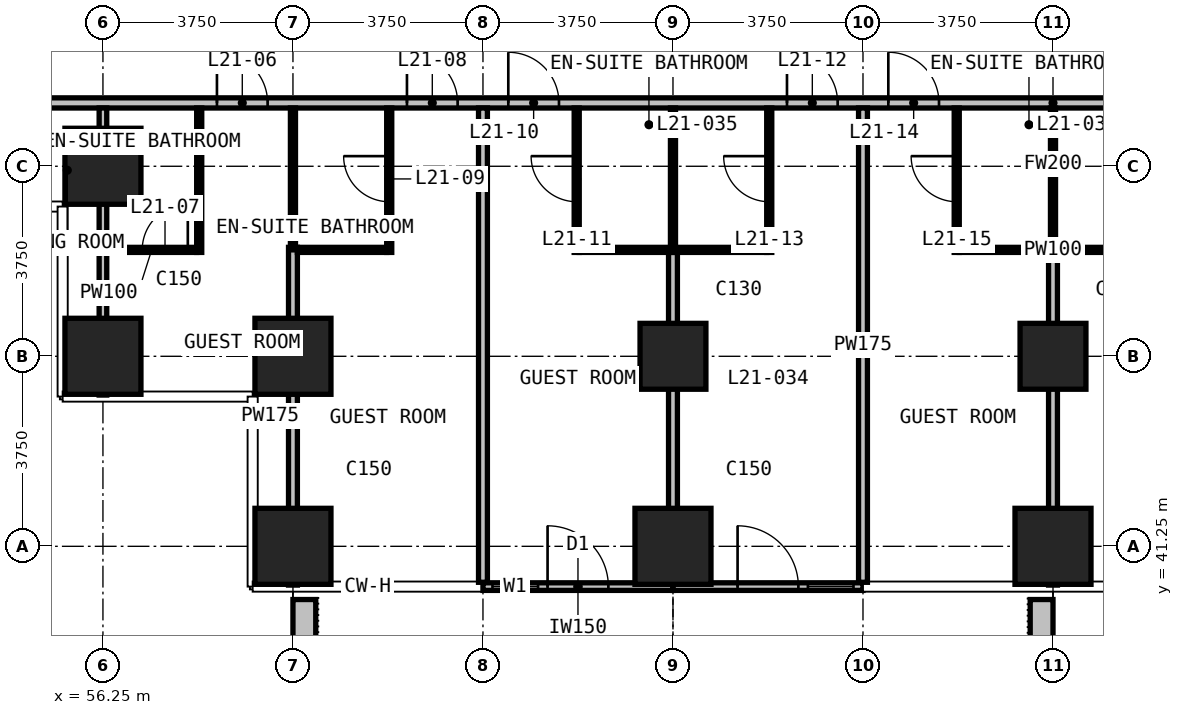
"""IFC4 building model, lengths in metres.
Left out: names, types, materials, properties, quantities, classifications, styles, units other than length and angle.
Written with IfcOpenShell. Run it as: python <this file> out.ifc"""

import sys

from ifc_helpers import new_model, si_unit, direction, frame, frame_2d, origin, origin_2d, place, context, subcontext, project, spatial, rectangle, extrude, element, fill, save


model = new_model("IFC4")
c1 = context("Model", 3, precision=1e-05, world=origin(), true_north=direction((0.0, 1.0)))
c2 = subcontext(c1, "Body", "Model", "MODEL_VIEW")
j1 = project(units=[si_unit("LENGTHUNIT", "METRE"), si_unit("PLANEANGLEUNIT", "RADIAN")], contexts=[c1])
p1 = place(None, origin())
s1 = spatial("IfcSite", under=j1, at=p1, CompositionType="ELEMENT")
p2 = place(p1, origin())
s2 = spatial("IfcBuilding", under=s1, at=p2, CompositionType="ELEMENT")
p3 = place(p2, frame((0.0, 0.0, 89.0)))
s3 = spatial("IfcBuildingStorey", under=s2, at=p3, CompositionType="ELEMENT", Elevation=89.0)
for number, where, z_axis, x_axis in (
    (1, (56.25, 45.0, 0.0), (0.0, 0.0, 1.0), (1.0, 0.0, 0.0)),
    (2, (56.25, 48.75, 0.0), (0.0, 0.0, 1.0), (1.0, 0.0, 0.0)),
    (3, (60.0, 41.25, 0.0), (0.0, 0.0, 1.0), (1.0, 0.0, 0.0)),
    (4, (60.0, 45.0, 0.0), (0.0, 0.0, 1.0), (1.0, 0.0, 0.0)),
    (5, (67.5, 41.25, 0.0), (0.0, 0.0, 1.0), (1.0, 0.0, 0.0)),
):
    element("IfcColumn", number, at=place(p3, frame(where, z_axis=z_axis, x_axis=x_axis)), inside=s3, PredefinedType="COLUMN", context=c2, shape_type="SweptSolid", body=[
        extrude(rectangle(XDim=1.5, YDim=1.5, at=origin_2d()), origin(), (0.0, 0.0, 1.0), 3.3),
    ])
p4 = place(p3, frame((67.5, 45.0, 0.0), z_axis=(0.0, 0.0, 1.0), x_axis=(1.0, 0.0, 0.0)))
e6 = element("IfcColumn", 6, at=p4, inside=s3, PredefinedType="COLUMN", context=c2, shape_type="SweptSolid", body=[
    extrude(rectangle(XDim=1.3, YDim=1.3, at=origin_2d()), origin(), (0.0, 0.0, 1.0), 3.3),
])
p5 = place(p3, frame((75.0, 41.25, 0.0), z_axis=(0.0, 0.0, 1.0), x_axis=(1.0, 0.0, 0.0)))
e7 = element("IfcColumn", 7, at=p5, inside=s3, PredefinedType="COLUMN", context=c2, shape_type="SweptSolid", body=[
    extrude(rectangle(XDim=1.5, YDim=1.5, at=origin_2d()), origin(), (0.0, 0.0, 1.0), 3.3),
])
p6 = place(p3, frame((75.0, 45.0, 0.0), z_axis=(0.0, 0.0, 1.0), x_axis=(1.0, 0.0, 0.0)))
e8 = element("IfcColumn", 8, at=p6, inside=s3, PredefinedType="COLUMN", context=c2, shape_type="SweptSolid", body=[
    extrude(rectangle(XDim=1.3, YDim=1.3, at=origin_2d()), origin(), (0.0, 0.0, 1.0), 3.3),
])
p7 = place(p3, frame((63.75, 40.455, 0.0), z_axis=(0.0, 0.0, 1.0), x_axis=(1.0, 0.0, 0.0)))
e9 = element("IfcWall", 9, at=p7, inside=s3, PredefinedType="SOLIDWALL", context=c2, shape_type="SweptSolid", body=[
    extrude(rectangle(XDim=3.75, YDim=0.15, at=frame_2d((1.875, 0.0))), origin(), (0.0, 0.0, 1.0), 3.0),
])
p8 = place(p7, frame((0.188, 0.0, 0.1)))
e10 = element("IfcOpeningElement", 10, at=p8, cuts=e9, PredefinedType="OPENING", context=c2, shape_type="SweptSolid", body=[
    extrude(rectangle(XDim=0.9, YDim=2.4, at=frame_2d((0.45, 1.2))), frame((0.0, 0.085, 0.0), z_axis=(0.0, -1.0, 0.0), x_axis=(1.0, 0.0, 0.0)), (0.0, 0.0, 1.0), 0.17),
])
p9 = place(p7, frame((1.275, 0.0, 0.0)))
e11 = element("IfcOpeningElement", 11, at=p9, cuts=e9, PredefinedType="OPENING", context=c2, shape_type="SweptSolid", body=[
    extrude(rectangle(XDim=1.2, YDim=2.4, at=frame_2d((0.6, 1.2))), frame((0.0, 0.085, 0.0), z_axis=(0.0, -1.0, 0.0), x_axis=(1.0, 0.0, 0.0)), (0.0, 0.0, 1.0), 0.17),
])
p10 = place(p3, frame((67.5, 40.455, 0.0), z_axis=(0.0, 0.0, 1.0), x_axis=(1.0, 0.0, 0.0)))
e12 = element("IfcWall", 12, at=p10, inside=s3, PredefinedType="SOLIDWALL", context=c2, shape_type="SweptSolid", body=[
    extrude(rectangle(XDim=3.75, YDim=0.15, at=frame_2d((1.875, 0.0))), origin(), (0.0, 0.0, 1.0), 3.0),
])
p11 = place(p10, frame((1.275, 0.0, 0.0)))
e13 = element("IfcOpeningElement", 13, at=p11, cuts=e12, PredefinedType="OPENING", context=c2, shape_type="SweptSolid", body=[
    extrude(rectangle(XDim=1.2, YDim=2.4, at=frame_2d((0.6, 1.2))), frame((0.0, 0.085, 0.0), z_axis=(0.0, -1.0, 0.0), x_axis=(1.0, 0.0, 0.0)), (0.0, 0.0, 1.0), 0.17),
])
p12 = place(p10, frame((2.663, 0.0, 0.1)))
e14 = element("IfcOpeningElement", 14, at=p12, cuts=e12, PredefinedType="OPENING", context=c2, shape_type="SweptSolid", body=[
    extrude(rectangle(XDim=0.9, YDim=2.4, at=frame_2d((0.45, 1.2))), frame((0.0, 0.085, 0.0), z_axis=(0.0, -1.0, 0.0), x_axis=(1.0, 0.0, 0.0)), (0.0, 0.0, 1.0), 0.17),
])
for number, where, z_axis, x_axis in (
    (15, (60.225, 40.2, 0.0), (0.0, 0.0, 1.0), (0.0, -1.0, 0.0)),
    (16, (74.775, 40.2, 0.0), (0.0, 0.0, 1.0), (0.0, -1.0, 0.0)),
):
    element("IfcWall", number, at=place(p3, frame(where, z_axis=z_axis, x_axis=x_axis)), inside=s3, PredefinedType="USERDEFINED", context=c2, shape_type="SweptSolid", body=[
        extrude(rectangle(XDim=2.35, YDim=0.45, at=frame_2d((1.175, 0.0))), origin(), (0.0, 0.0, 1.0), 1.1),
    ])
p13 = place(p3, frame((51.735, 50.0, 0.0), z_axis=(0.0, 0.0, 1.0), x_axis=(1.0, 0.0, 0.0)))
e17 = element("IfcWall", 17, at=p13, inside=s3, PredefinedType="PARTITIONING", context=c2, shape_type="SweptSolid", body=[
    extrude(rectangle(XDim=46.53, YDim=0.2, at=frame_2d((23.265, 0.0))), origin(), (0.0, 0.0, 1.0), 3.0),
])
p14 = place(p13, frame((6.765, 0.0, 0.0)))
e18 = element("IfcOpeningElement", 18, at=p14, cuts=e17, PredefinedType="OPENING", context=c2, shape_type="SweptSolid", body=[
    extrude(rectangle(XDim=1.0, YDim=2.2, at=frame_2d((0.5, 1.1))), frame((0.0, 0.11, 0.0), z_axis=(0.0, -1.0, 0.0), x_axis=(1.0, 0.0, 0.0)), (0.0, 0.0, 1.0), 0.22),
])
p15 = place(p13, frame((10.515, 0.0, 0.0)))
e19 = element("IfcOpeningElement", 19, at=p15, cuts=e17, PredefinedType="OPENING", context=c2, shape_type="SweptSolid", body=[
    extrude(rectangle(XDim=1.0, YDim=2.2, at=frame_2d((0.5, 1.1))), frame((0.0, 0.11, 0.0), z_axis=(0.0, -1.0, 0.0), x_axis=(1.0, 0.0, 0.0)), (0.0, 0.0, 1.0), 0.22),
])
p16 = place(p13, frame((12.515, 0.0, 0.0)))
e20 = element("IfcOpeningElement", 20, at=p16, cuts=e17, PredefinedType="OPENING", context=c2, shape_type="SweptSolid", body=[
    extrude(rectangle(XDim=1.0, YDim=2.2, at=frame_2d((0.5, 1.1))), frame((0.0, 0.11, 0.0), z_axis=(0.0, -1.0, 0.0), x_axis=(1.0, 0.0, 0.0)), (0.0, 0.0, 1.0), 0.22),
])
p17 = place(p13, frame((18.015, 0.0, 0.0)))
e21 = element("IfcOpeningElement", 21, at=p17, cuts=e17, PredefinedType="OPENING", context=c2, shape_type="SweptSolid", body=[
    extrude(rectangle(XDim=1.0, YDim=2.2, at=frame_2d((0.5, 1.1))), frame((0.0, 0.11, 0.0), z_axis=(0.0, -1.0, 0.0), x_axis=(1.0, 0.0, 0.0)), (0.0, 0.0, 1.0), 0.22),
])
p18 = place(p13, frame((20.015, 0.0, 0.0)))
e22 = element("IfcOpeningElement", 22, at=p18, cuts=e17, PredefinedType="OPENING", context=c2, shape_type="SweptSolid", body=[
    extrude(rectangle(XDim=1.0, YDim=2.2, at=frame_2d((0.5, 1.1))), frame((0.0, 0.11, 0.0), z_axis=(0.0, -1.0, 0.0), x_axis=(1.0, 0.0, 0.0)), (0.0, 0.0, 1.0), 0.22),
])
p19 = place(p13, frame((25.515, 0.0, 0.0)))
e23 = element("IfcOpeningElement", 23, at=p19, cuts=e17, PredefinedType="OPENING", context=c2, shape_type="SweptSolid", body=[
    extrude(rectangle(XDim=1.0, YDim=2.2, at=frame_2d((0.5, 1.1))), frame((0.0, 0.11, 0.0), z_axis=(0.0, -1.0, 0.0), x_axis=(1.0, 0.0, 0.0)), (0.0, 0.0, 1.0), 0.22),
])
p20 = place(p13, frame((27.515, 0.0, 0.0)))
e24 = element("IfcOpeningElement", 24, at=p20, cuts=e17, PredefinedType="OPENING", context=c2, shape_type="SweptSolid", body=[
    extrude(rectangle(XDim=1.0, YDim=2.2, at=frame_2d((0.5, 1.1))), frame((0.0, 0.11, 0.0), z_axis=(0.0, -1.0, 0.0), x_axis=(1.0, 0.0, 0.0)), (0.0, 0.0, 1.0), 0.22),
])
p21 = place(p13, frame((33.015, 0.0, 0.0)))
e25 = element("IfcOpeningElement", 25, at=p21, cuts=e17, PredefinedType="OPENING", context=c2, shape_type="SweptSolid", body=[
    extrude(rectangle(XDim=1.0, YDim=2.2, at=frame_2d((0.5, 1.1))), frame((0.0, 0.11, 0.0), z_axis=(0.0, -1.0, 0.0), x_axis=(1.0, 0.0, 0.0)), (0.0, 0.0, 1.0), 0.22),
])
p22 = place(p13, frame((35.015, 0.0, 0.0)))
e26 = element("IfcOpeningElement", 26, at=p22, cuts=e17, PredefinedType="OPENING", context=c2, shape_type="SweptSolid", body=[
    extrude(rectangle(XDim=1.0, YDim=2.2, at=frame_2d((0.5, 1.1))), frame((0.0, 0.11, 0.0), z_axis=(0.0, -1.0, 0.0), x_axis=(1.0, 0.0, 0.0)), (0.0, 0.0, 1.0), 0.22),
])
p23 = place(p13, frame((38.765, 0.0, 0.0)))
e27 = element("IfcOpeningElement", 27, at=p23, cuts=e17, PredefinedType="OPENING", context=c2, shape_type="SweptSolid", body=[
    extrude(rectangle(XDim=1.0, YDim=2.2, at=frame_2d((0.5, 1.1))), frame((0.0, 0.11, 0.0), z_axis=(0.0, -1.0, 0.0), x_axis=(1.0, 0.0, 0.0)), (0.0, 0.0, 1.0), 0.22),
])
p24 = place(p13, frame((1.8, 0.0, 0.0)))
e28 = element("IfcOpeningElement", 28, at=p24, cuts=e17, PredefinedType="OPENING", context=c2, shape_type="SweptSolid", body=[
    extrude(rectangle(XDim=0.9, YDim=2.2, at=frame_2d((0.45, 1.1))), frame((0.0, 0.11, 0.0), z_axis=(0.0, -1.0, 0.0), x_axis=(1.0, 0.0, 0.0)), (0.0, 0.0, 1.0), 0.22),
])
p25 = place(p13, frame((43.815, 0.0, 0.0)))
e29 = element("IfcOpeningElement", 29, at=p25, cuts=e17, PredefinedType="OPENING", context=c2, shape_type="SweptSolid", body=[
    extrude(rectangle(XDim=0.9, YDim=2.2, at=frame_2d((0.45, 1.1))), frame((0.0, 0.11, 0.0), z_axis=(0.0, -1.0, 0.0), x_axis=(1.0, 0.0, 0.0)), (0.0, 0.0, 1.0), 0.22),
])
p26 = place(p3, frame((60.0, 40.485, 0.0), z_axis=(0.0, 0.0, 1.0), x_axis=(0.0, 1.0, 0.0)))
e30 = element("IfcWall", 30, at=p26, inside=s3, PredefinedType="PARTITIONING", context=c2, shape_type="SweptSolid", body=[
    extrude(rectangle(XDim=6.665, YDim=0.175, at=frame_2d((3.333, 0.0))), origin(), (0.0, 0.0, 1.0), 3.0),
])
p27 = place(p3, frame((63.75, 40.54, 0.0), z_axis=(0.0, 0.0, 1.0), x_axis=(0.0, 1.0, 0.0)))
e31 = element("IfcWall", 31, at=p27, inside=s3, PredefinedType="PARTITIONING", context=c2, shape_type="SweptSolid", body=[
    extrude(rectangle(XDim=9.36, YDim=0.175, at=frame_2d((4.68, 0.0))), origin(), (0.0, 0.0, 1.0), 3.0),
])
p28 = place(p3, frame((67.5, 40.54, 0.0), z_axis=(0.0, 0.0, 1.0), x_axis=(0.0, 1.0, 0.0)))
e32 = element("IfcWall", 32, at=p28, inside=s3, PredefinedType="PARTITIONING", context=c2, shape_type="SweptSolid", body=[
    extrude(rectangle(XDim=6.51, YDim=0.175, at=frame_2d((3.255, 0.0))), origin(), (0.0, 0.0, 1.0), 3.0),
])
p29 = place(p3, frame((71.25, 40.54, 0.0), z_axis=(0.0, 0.0, 1.0), x_axis=(0.0, 1.0, 0.0)))
e33 = element("IfcWall", 33, at=p29, inside=s3, PredefinedType="PARTITIONING", context=c2, shape_type="SweptSolid", body=[
    extrude(rectangle(XDim=9.36, YDim=0.175, at=frame_2d((4.68, 0.0))), origin(), (0.0, 0.0, 1.0), 3.0),
])
p30 = place(p3, frame((75.0, 40.485, 0.0), z_axis=(0.0, 0.0, 1.0), x_axis=(0.0, 1.0, 0.0)))
e34 = element("IfcWall", 34, at=p30, inside=s3, PredefinedType="PARTITIONING", context=c2, shape_type="SweptSolid", body=[
    extrude(rectangle(XDim=6.565, YDim=0.175, at=frame_2d((3.282, 0.0))), origin(), (0.0, 0.0, 1.0), 3.0),
])
p31 = place(p3, frame((56.25, 44.235, 0.0), z_axis=(0.0, 0.0, 1.0), x_axis=(0.0, 1.0, 0.0)))
e35 = element("IfcWall", 35, at=p31, inside=s3, PredefinedType="PARTITIONING", context=c2, shape_type="SweptSolid", body=[
    extrude(rectangle(XDim=5.665, YDim=0.15, at=frame_2d((2.833, 0.0))), origin(), (0.0, 0.0, 1.0), 3.0),
])
p32 = place(p3, frame((56.325, 47.1, 0.0), z_axis=(0.0, 0.0, 1.0), x_axis=(1.0, 0.0, 0.0)))
e36 = element("IfcWall", 36, at=p32, inside=s3, PredefinedType="PARTITIONING", context=c2, shape_type="SweptSolid", body=[
    extrude(rectangle(XDim=1.775, YDim=0.1, at=frame_2d((0.888, 0.0))), origin(), (0.0, 0.0, 1.0), 3.0),
])
p33 = place(p32, frame((0.7, 0.0, 0.0)))
e37 = element("IfcOpeningElement", 37, at=p33, cuts=e36, PredefinedType="OPENING", context=c2, shape_type="SweptSolid", body=[
    extrude(rectangle(XDim=0.9, YDim=2.2, at=frame_2d((0.45, 1.1))), frame((0.0, 0.06, 0.0), z_axis=(0.0, -1.0, 0.0), x_axis=(1.0, 0.0, 0.0)), (0.0, 0.0, 1.0), 0.12),
])
p34 = place(p3, frame((60.088, 47.1, 0.0), z_axis=(0.0, 0.0, 1.0), x_axis=(1.0, 0.0, 0.0)))
e38 = element("IfcWall", 38, at=p34, inside=s3, PredefinedType="PARTITIONING", context=c2, shape_type="SweptSolid", body=[
    extrude(rectangle(XDim=1.762, YDim=0.1, at=frame_2d((0.881, 0.0))), origin(), (0.0, 0.0, 1.0), 3.0),
])
for number, where, z_axis, x_axis in (
    (39, (65.65, 47.1, 0.0), (0.0, 0.0, 1.0), (1.0, 0.0, 0.0)),
    (40, (73.15, 47.1, 0.0), (0.0, 0.0, 1.0), (1.0, 0.0, 0.0)),
):
    element("IfcWall", number, at=place(p3, frame(where, z_axis=z_axis, x_axis=x_axis)), inside=s3, PredefinedType="PARTITIONING", context=c2, shape_type="SweptSolid", body=[
        extrude(rectangle(XDim=3.7, YDim=0.1, at=frame_2d((1.85, 0.0))), origin(), (0.0, 0.0, 1.0), 3.0),
    ])
p35 = place(p3, frame((58.15, 47.05, 0.0), z_axis=(0.0, 0.0, 1.0), x_axis=(0.0, 1.0, 0.0)))
e41 = element("IfcWall", 41, at=p35, inside=s3, PredefinedType="PARTITIONING", context=c2, shape_type="SweptSolid", body=[
    extrude(rectangle(XDim=2.85, YDim=0.1, at=frame_2d((1.425, 0.0))), origin(), (0.0, 0.0, 1.0), 3.0),
])
p36 = place(p3, frame((60.0, 47.1, 0.0), z_axis=(0.0, 0.0, 1.0), x_axis=(0.0, 1.0, 0.0)))
e42 = element("IfcWall", 42, at=p36, inside=s3, PredefinedType="PARTITIONING", context=c2, shape_type="SweptSolid", body=[
    extrude(rectangle(XDim=2.8, YDim=0.1, at=frame_2d((1.4, 0.0))), origin(), (0.0, 0.0, 1.0), 3.0),
])
p37 = place(p3, frame((61.9, 47.05, 0.0), z_axis=(0.0, 0.0, 1.0), x_axis=(0.0, 1.0, 0.0)))
e43 = element("IfcWall", 43, at=p37, inside=s3, PredefinedType="PARTITIONING", context=c2, shape_type="SweptSolid", body=[
    extrude(rectangle(XDim=2.85, YDim=0.1, at=frame_2d((1.425, 0.0))), origin(), (0.0, 0.0, 1.0), 3.0),
])
p38 = place(p37, frame((1.0, 0.0, 0.0)))
e44 = element("IfcOpeningElement", 44, at=p38, cuts=e43, PredefinedType="OPENING", context=c2, shape_type="SweptSolid", body=[
    extrude(rectangle(XDim=0.9, YDim=2.2, at=frame_2d((0.45, 1.1))), frame((0.0, 0.06, 0.0), z_axis=(0.0, -1.0, 0.0), x_axis=(1.0, 0.0, 0.0)), (0.0, 0.0, 1.0), 0.12),
])
p39 = place(p3, frame((65.6, 47.05, 0.0), z_axis=(0.0, 0.0, 1.0), x_axis=(0.0, 1.0, 0.0)))
e45 = element("IfcWall", 45, at=p39, inside=s3, PredefinedType="PARTITIONING", context=c2, shape_type="SweptSolid", body=[
    extrude(rectangle(XDim=2.85, YDim=0.1, at=frame_2d((1.425, 0.0))), origin(), (0.0, 0.0, 1.0), 3.0),
])
p40 = place(p39, frame((1.0, 0.0, 0.0)))
e46 = element("IfcOpeningElement", 46, at=p40, cuts=e45, PredefinedType="OPENING", context=c2, shape_type="SweptSolid", body=[
    extrude(rectangle(XDim=0.9, YDim=2.2, at=frame_2d((0.45, 1.1))), frame((0.0, 0.06, 0.0), z_axis=(0.0, -1.0, 0.0), x_axis=(1.0, 0.0, 0.0)), (0.0, 0.0, 1.0), 0.12),
])
p41 = place(p3, frame((67.5, 47.15, 0.0), z_axis=(0.0, 0.0, 1.0), x_axis=(0.0, 1.0, 0.0)))
e47 = element("IfcWall", 47, at=p41, inside=s3, PredefinedType="PARTITIONING", context=c2, shape_type="SweptSolid", body=[
    extrude(rectangle(XDim=2.75, YDim=0.1, at=frame_2d((1.375, 0.0))), origin(), (0.0, 0.0, 1.0), 3.0),
])
p42 = place(p3, frame((69.4, 47.05, 0.0), z_axis=(0.0, 0.0, 1.0), x_axis=(0.0, 1.0, 0.0)))
e48 = element("IfcWall", 48, at=p42, inside=s3, PredefinedType="PARTITIONING", context=c2, shape_type="SweptSolid", body=[
    extrude(rectangle(XDim=2.85, YDim=0.1, at=frame_2d((1.425, 0.0))), origin(), (0.0, 0.0, 1.0), 3.0),
])
p43 = place(p42, frame((1.0, 0.0, 0.0)))
e49 = element("IfcOpeningElement", 49, at=p43, cuts=e48, PredefinedType="OPENING", context=c2, shape_type="SweptSolid", body=[
    extrude(rectangle(XDim=0.9, YDim=2.2, at=frame_2d((0.45, 1.1))), frame((0.0, 0.06, 0.0), z_axis=(0.0, -1.0, 0.0), x_axis=(1.0, 0.0, 0.0)), (0.0, 0.0, 1.0), 0.12),
])
p44 = place(p3, frame((73.1, 47.05, 0.0), z_axis=(0.0, 0.0, 1.0), x_axis=(0.0, 1.0, 0.0)))
e50 = element("IfcWall", 50, at=p44, inside=s3, PredefinedType="PARTITIONING", context=c2, shape_type="SweptSolid", body=[
    extrude(rectangle(XDim=2.85, YDim=0.1, at=frame_2d((1.425, 0.0))), origin(), (0.0, 0.0, 1.0), 3.0),
])
p45 = place(p44, frame((1.0, 0.0, 0.0)))
e51 = element("IfcOpeningElement", 51, at=p45, cuts=e50, PredefinedType="OPENING", context=c2, shape_type="SweptSolid", body=[
    extrude(rectangle(XDim=0.9, YDim=2.2, at=frame_2d((0.45, 1.1))), frame((0.0, 0.06, 0.0), z_axis=(0.0, -1.0, 0.0), x_axis=(1.0, 0.0, 0.0)), (0.0, 0.0, 1.0), 0.12),
])
p46 = place(p3, frame((75.0, 47.15, 0.0), z_axis=(0.0, 0.0, 1.0), x_axis=(0.0, 1.0, 0.0)))
e52 = element("IfcWall", 52, at=p46, inside=s3, PredefinedType="PARTITIONING", context=c2, shape_type="SweptSolid", body=[
    extrude(rectangle(XDim=2.75, YDim=0.1, at=frame_2d((1.375, 0.0))), origin(), (0.0, 0.0, 1.0), 3.0),
])
p47 = place(p8, origin())
e53 = element("IfcWindow", 53, at=p47, inside=s3, PartitioningType="SINGLE_PANEL", PredefinedType="WINDOW", context=c2, shape_type="SweptSolid", body=[
    extrude(rectangle(XDim=0.9, YDim=2.4, at=frame_2d((0.45, 1.2))), frame((0.0, 0.03, 0.0), z_axis=(0.0, -1.0, 0.0), x_axis=(1.0, 0.0, 0.0)), (0.0, 0.0, 1.0), 0.06),
])
fill(e10, e53)
p48 = place(p9, origin())
e54 = element("IfcDoor", 54, at=p48, inside=s3, OperationType="SINGLE_SWING_LEFT", PredefinedType="DOOR", context=c2, shape_type="SweptSolid", body=[
    extrude(rectangle(XDim=1.2, YDim=2.4, at=frame_2d((0.6, 1.2))), frame((0.0, 0.025, 0.0), z_axis=(0.0, -1.0, 0.0), x_axis=(1.0, 0.0, 0.0)), (0.0, 0.0, 1.0), 0.05),
])
fill(e11, e54)
p49 = place(p11, origin())
e55 = element("IfcDoor", 55, at=p49, inside=s3, OperationType="SINGLE_SWING_LEFT", PredefinedType="DOOR", context=c2, shape_type="SweptSolid", body=[
    extrude(rectangle(XDim=1.2, YDim=2.4, at=frame_2d((0.6, 1.2))), frame((0.0, 0.025, 0.0), z_axis=(0.0, -1.0, 0.0), x_axis=(1.0, 0.0, 0.0)), (0.0, 0.0, 1.0), 0.05),
])
fill(e13, e55)
p50 = place(p12, origin())
e56 = element("IfcWindow", 56, at=p50, inside=s3, PartitioningType="SINGLE_PANEL", PredefinedType="WINDOW", context=c2, shape_type="SweptSolid", body=[
    extrude(rectangle(XDim=0.9, YDim=2.4, at=frame_2d((0.45, 1.2))), frame((0.0, 0.03, 0.0), z_axis=(0.0, -1.0, 0.0), x_axis=(1.0, 0.0, 0.0)), (0.0, 0.0, 1.0), 0.06),
])
fill(e14, e56)
p51 = place(p14, origin())
e57 = element("IfcDoor", 57, at=p51, inside=s3, OperationType="SINGLE_SWING_LEFT", PredefinedType="DOOR", context=c2, shape_type="SweptSolid", body=[
    extrude(rectangle(XDim=1.0, YDim=2.2, at=frame_2d((0.5, 1.1))), frame((0.0, 0.025, 0.0), z_axis=(0.0, -1.0, 0.0), x_axis=(1.0, 0.0, 0.0)), (0.0, 0.0, 1.0), 0.05),
])
fill(e18, e57)
p52 = place(p33, origin())
e58 = element("IfcDoor", 58, at=p52, inside=s3, OperationType="SINGLE_SWING_RIGHT", PredefinedType="DOOR", context=c2, shape_type="SweptSolid", body=[
    extrude(rectangle(XDim=0.9, YDim=2.2, at=frame_2d((0.45, 1.1))), frame((0.0, 0.025, 0.0), z_axis=(0.0, -1.0, 0.0), x_axis=(1.0, 0.0, 0.0)), (0.0, 0.0, 1.0), 0.05),
])
fill(e37, e58)
p53 = place(p15, origin())
e59 = element("IfcDoor", 59, at=p53, inside=s3, OperationType="SINGLE_SWING_LEFT", PredefinedType="DOOR", context=c2, shape_type="SweptSolid", body=[
    extrude(rectangle(XDim=1.0, YDim=2.2, at=frame_2d((0.5, 1.1))), frame((0.0, 0.025, 0.0), z_axis=(0.0, -1.0, 0.0), x_axis=(1.0, 0.0, 0.0)), (0.0, 0.0, 1.0), 0.05),
])
fill(e19, e59)
p54 = place(p38, origin())
e60 = element("IfcDoor", 60, at=p54, inside=s3, OperationType="SINGLE_SWING_RIGHT", PredefinedType="DOOR", context=c2, shape_type="SweptSolid", body=[
    extrude(rectangle(XDim=0.9, YDim=2.2, at=frame_2d((0.45, 1.1))), frame((0.0, 0.025, 0.0), z_axis=(0.0, -1.0, 0.0), x_axis=(1.0, 0.0, 0.0)), (0.0, 0.0, 1.0), 0.05),
])
fill(e44, e60)
p55 = place(p16, origin())
e61 = element("IfcDoor", 61, at=p55, inside=s3, OperationType="SINGLE_SWING_RIGHT", PredefinedType="DOOR", context=c2, shape_type="SweptSolid", body=[
    extrude(rectangle(XDim=1.0, YDim=2.2, at=frame_2d((0.5, 1.1))), frame((0.0, 0.025, 0.0), z_axis=(0.0, -1.0, 0.0), x_axis=(1.0, 0.0, 0.0)), (0.0, 0.0, 1.0), 0.05),
])
fill(e20, e61)
p56 = place(p40, origin())
e62 = element("IfcDoor", 62, at=p56, inside=s3, OperationType="SINGLE_SWING_RIGHT", PredefinedType="DOOR", context=c2, shape_type="SweptSolid", body=[
    extrude(rectangle(XDim=0.9, YDim=2.2, at=frame_2d((0.45, 1.1))), frame((0.0, 0.025, 0.0), z_axis=(0.0, -1.0, 0.0), x_axis=(1.0, 0.0, 0.0)), (0.0, 0.0, 1.0), 0.05),
])
fill(e46, e62)
p57 = place(p17, origin())
e63 = element("IfcDoor", 63, at=p57, inside=s3, OperationType="SINGLE_SWING_LEFT", PredefinedType="DOOR", context=c2, shape_type="SweptSolid", body=[
    extrude(rectangle(XDim=1.0, YDim=2.2, at=frame_2d((0.5, 1.1))), frame((0.0, 0.025, 0.0), z_axis=(0.0, -1.0, 0.0), x_axis=(1.0, 0.0, 0.0)), (0.0, 0.0, 1.0), 0.05),
])
fill(e21, e63)
p58 = place(p43, origin())
e64 = element("IfcDoor", 64, at=p58, inside=s3, OperationType="SINGLE_SWING_RIGHT", PredefinedType="DOOR", context=c2, shape_type="SweptSolid", body=[
    extrude(rectangle(XDim=0.9, YDim=2.2, at=frame_2d((0.45, 1.1))), frame((0.0, 0.025, 0.0), z_axis=(0.0, -1.0, 0.0), x_axis=(1.0, 0.0, 0.0)), (0.0, 0.0, 1.0), 0.05),
])
fill(e49, e64)
p59 = place(p18, origin())
e65 = element("IfcDoor", 65, at=p59, inside=s3, OperationType="SINGLE_SWING_RIGHT", PredefinedType="DOOR", context=c2, shape_type="SweptSolid", body=[
    extrude(rectangle(XDim=1.0, YDim=2.2, at=frame_2d((0.5, 1.1))), frame((0.0, 0.025, 0.0), z_axis=(0.0, -1.0, 0.0), x_axis=(1.0, 0.0, 0.0)), (0.0, 0.0, 1.0), 0.05),
])
fill(e22, e65)
p60 = place(p45, origin())
e66 = element("IfcDoor", 66, at=p60, inside=s3, OperationType="SINGLE_SWING_RIGHT", PredefinedType="DOOR", context=c2, shape_type="SweptSolid", body=[
    extrude(rectangle(XDim=0.9, YDim=2.2, at=frame_2d((0.45, 1.1))), frame((0.0, 0.025, 0.0), z_axis=(0.0, -1.0, 0.0), x_axis=(1.0, 0.0, 0.0)), (0.0, 0.0, 1.0), 0.05),
])
fill(e51, e66)
save(model, sys.argv[1])
